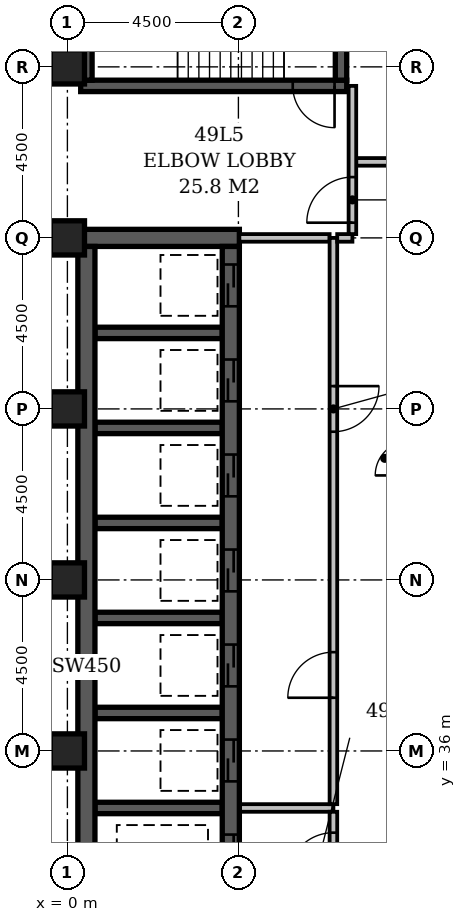
"""IFC4 building model, lengths in metres.
Left out: names, types, materials, properties, quantities, classifications, styles, units other than length and angle.
Written with IfcOpenShell. Run it as: python <this file> out.ifc"""

import sys

from ifc_helpers import new_model, si_unit, direction, frame, frame_2d, origin, origin_2d, place, context, subcontext, project, spatial, rectangle, extrude, element, fill, save


model = new_model("IFC4")
c1 = context("Model", 3, precision=1e-05, world=origin(), true_north=direction((0.0, 1.0)))
c2 = subcontext(c1, "Body", "Model", "MODEL_VIEW")
j1 = project(units=[si_unit("LENGTHUNIT", "METRE"), si_unit("PLANEANGLEUNIT", "RADIAN")], contexts=[c1])
p1 = place(None, origin())
s1 = spatial("IfcSite", under=j1, at=p1, CompositionType="ELEMENT")
p2 = place(p1, origin())
s2 = spatial("IfcBuilding", under=s1, at=p2, CompositionType="ELEMENT")
p3 = place(p2, frame((0.0, 0.0, 193.4)))
s3 = spatial("IfcBuildingStorey", under=s2, at=p3, CompositionType="ELEMENT", Elevation=193.4)
p4 = place(p3, frame((0.275, 49.5, -0.3), z_axis=(0.0, 0.0, 1.0), x_axis=(1.0, 0.0, 0.0)))
e1 = element("IfcWall", 1, at=p4, inside=s3, PredefinedType="SHEAR", context=c2, shape_type="SweptSolid", body=[
    extrude(rectangle(XDim=4.25, YDim=0.45, at=frame_2d((2.125, 0.0))), origin(), (0.0, 0.0, 1.0), 3.6),
])
p5 = place(p3, frame((0.35, 53.5, -0.3), z_axis=(0.0, 0.0, 1.0), x_axis=(1.0, 0.0, 0.0)))
e2 = element("IfcWall", 2, at=p5, inside=s3, PredefinedType="SHEAR", context=c2, shape_type="SweptSolid", body=[
    extrude(rectangle(XDim=7.0, YDim=0.3, at=frame_2d((3.5, 0.0))), origin(), (0.0, 0.0, 1.0), 3.6),
])
p6 = place(p5, frame((5.58, 0.0, 0.3)))
e3 = element("IfcOpeningElement", 3, at=p6, cuts=e2, PredefinedType="OPENING", context=c2, shape_type="SweptSolid", body=[
    extrude(rectangle(XDim=1.1, YDim=2.1, at=frame_2d((0.55, 1.05))), frame((0.0, 0.162, 0.0), z_axis=(0.0, -1.0, 0.0), x_axis=(1.0, 0.0, 0.0)), (0.0, 0.0, 1.0), 0.324),
])
p7 = place(p3, frame((0.5, 27.15, -0.3), z_axis=(0.0, 0.0, 1.0), x_axis=(0.0, 1.0, 0.0)))
e4 = element("IfcWall", 4, at=p7, inside=s3, PredefinedType="SHEAR", context=c2, shape_type="SweptSolid", body=[
    extrude(rectangle(XDim=22.125, YDim=0.45, at=frame_2d((11.062, 0.0))), origin(), (0.0, 0.0, 1.0), 3.6),
])
p8 = place(p3, frame((0.5, 53.65, -0.3), z_axis=(0.0, 0.0, 1.0), x_axis=(0.0, 1.0, 0.0)))
e5 = element("IfcWall", 5, at=p8, inside=s3, PredefinedType="SHEAR", context=c2, shape_type="SweptSolid", body=[
    extrude(rectangle(XDim=4.2, YDim=0.3, at=frame_2d((2.1, 0.0))), origin(), (0.0, 0.0, 1.0), 3.6),
])
for number, where, z_axis, x_axis in (
    (6, (0.725, 34.5, -0.3), (0.0, 0.0, 1.0), (1.0, 0.0, 0.0)),
    (7, (0.725, 37.0, -0.3), (0.0, 0.0, 1.0), (1.0, 0.0, 0.0)),
    (8, (0.725, 39.5, -0.3), (0.0, 0.0, 1.0), (1.0, 0.0, 0.0)),
    (9, (0.725, 42.0, -0.3), (0.0, 0.0, 1.0), (1.0, 0.0, 0.0)),
    (10, (0.725, 44.5, -0.3), (0.0, 0.0, 1.0), (1.0, 0.0, 0.0)),
    (11, (0.725, 47.0, -0.3), (0.0, 0.0, 1.0), (1.0, 0.0, 0.0)),
):
    element("IfcWall", number, at=place(p3, frame(where, z_axis=z_axis, x_axis=x_axis)), inside=s3, PredefinedType="SHEAR", context=c2, shape_type="SweptSolid", body=[
        extrude(rectangle(XDim=3.35, YDim=0.3, at=frame_2d((1.675, 0.0))), origin(), (0.0, 0.0, 1.0), 3.6),
    ])
p9 = place(p3, frame((4.3, 27.15, -0.3), z_axis=(0.0, 0.0, 1.0), x_axis=(0.0, 1.0, 0.0)))
e12 = element("IfcWall", 12, at=p9, inside=s3, PredefinedType="SHEAR", context=c2, shape_type="SweptSolid", body=[
    extrude(rectangle(XDim=22.125, YDim=0.45, at=frame_2d((11.062, 0.0))), origin(), (0.0, 0.0, 1.0), 3.6),
])
p10 = place(p9, frame((3.05, 0.0, 0.3)))
e13 = element("IfcOpeningElement", 13, at=p10, cuts=e12, PredefinedType="OPENING", context=c2, shape_type="SweptSolid", body=[
    extrude(rectangle(XDim=1.1, YDim=2.1, at=frame_2d((0.55, 1.05))), frame((0.0, 0.237, 0.0), z_axis=(0.0, -1.0, 0.0), x_axis=(1.0, 0.0, 0.0)), (0.0, 0.0, 1.0), 0.474),
])
p11 = place(p9, frame((0.55, 0.0, 0.3)))
e14 = element("IfcOpeningElement", 14, at=p11, cuts=e12, PredefinedType="OPENING", context=c2, shape_type="SweptSolid", body=[
    extrude(rectangle(XDim=1.1, YDim=2.1, at=frame_2d((0.55, 1.05))), frame((0.0, 0.237, 0.0), z_axis=(0.0, -1.0, 0.0), x_axis=(1.0, 0.0, 0.0)), (0.0, 0.0, 1.0), 0.474),
])
p12 = place(p9, frame((20.55, 0.0, 0.3)))
e15 = element("IfcOpeningElement", 15, at=p12, cuts=e12, PredefinedType="OPENING", context=c2, shape_type="SweptSolid", body=[
    extrude(rectangle(XDim=1.1, YDim=2.1, at=frame_2d((0.55, 1.05))), frame((0.0, 0.237, 0.0), z_axis=(0.0, -1.0, 0.0), x_axis=(1.0, 0.0, 0.0)), (0.0, 0.0, 1.0), 0.474),
])
p13 = place(p9, frame((18.05, 0.0, 0.3)))
e16 = element("IfcOpeningElement", 16, at=p13, cuts=e12, PredefinedType="OPENING", context=c2, shape_type="SweptSolid", body=[
    extrude(rectangle(XDim=1.1, YDim=2.1, at=frame_2d((0.55, 1.05))), frame((0.0, 0.237, 0.0), z_axis=(0.0, -1.0, 0.0), x_axis=(1.0, 0.0, 0.0)), (0.0, 0.0, 1.0), 0.474),
])
p14 = place(p9, frame((15.55, 0.0, 0.3)))
e17 = element("IfcOpeningElement", 17, at=p14, cuts=e12, PredefinedType="OPENING", context=c2, shape_type="SweptSolid", body=[
    extrude(rectangle(XDim=1.1, YDim=2.1, at=frame_2d((0.55, 1.05))), frame((0.0, 0.237, 0.0), z_axis=(0.0, -1.0, 0.0), x_axis=(1.0, 0.0, 0.0)), (0.0, 0.0, 1.0), 0.474),
])
p15 = place(p9, frame((13.05, 0.0, 0.3)))
e18 = element("IfcOpeningElement", 18, at=p15, cuts=e12, PredefinedType="OPENING", context=c2, shape_type="SweptSolid", body=[
    extrude(rectangle(XDim=1.1, YDim=2.1, at=frame_2d((0.55, 1.05))), frame((0.0, 0.237, 0.0), z_axis=(0.0, -1.0, 0.0), x_axis=(1.0, 0.0, 0.0)), (0.0, 0.0, 1.0), 0.474),
])
p16 = place(p9, frame((10.55, 0.0, 0.3)))
e19 = element("IfcOpeningElement", 19, at=p16, cuts=e12, PredefinedType="OPENING", context=c2, shape_type="SweptSolid", body=[
    extrude(rectangle(XDim=1.1, YDim=2.1, at=frame_2d((0.55, 1.05))), frame((0.0, 0.237, 0.0), z_axis=(0.0, -1.0, 0.0), x_axis=(1.0, 0.0, 0.0)), (0.0, 0.0, 1.0), 0.474),
])
p17 = place(p9, frame((8.05, 0.0, 0.3)))
e20 = element("IfcOpeningElement", 20, at=p17, cuts=e12, PredefinedType="OPENING", context=c2, shape_type="SweptSolid", body=[
    extrude(rectangle(XDim=1.1, YDim=2.1, at=frame_2d((0.55, 1.05))), frame((0.0, 0.237, 0.0), z_axis=(0.0, -1.0, 0.0), x_axis=(1.0, 0.0, 0.0)), (0.0, 0.0, 1.0), 0.474),
])
p18 = place(p9, frame((5.55, 0.0, 0.3)))
e21 = element("IfcOpeningElement", 21, at=p18, cuts=e12, PredefinedType="OPENING", context=c2, shape_type="SweptSolid", body=[
    extrude(rectangle(XDim=1.1, YDim=2.1, at=frame_2d((0.55, 1.05))), frame((0.0, 0.237, 0.0), z_axis=(0.0, -1.0, 0.0), x_axis=(1.0, 0.0, 0.0)), (0.0, 0.0, 1.0), 0.474),
])
p19 = place(p3, frame((7.2, 53.65, -0.3), z_axis=(0.0, 0.0, 1.0), x_axis=(0.0, 1.0, 0.0)))
e22 = element("IfcWall", 22, at=p19, inside=s3, PredefinedType="SHEAR", context=c2, shape_type="SweptSolid", body=[
    extrude(rectangle(XDim=4.2, YDim=0.3, at=frame_2d((2.1, 0.0))), origin(), (0.0, 0.0, 1.0), 3.6),
])
for number, where, z_axis, x_axis in (
    (23, (0.0, 36.0, -0.3), (0.0, 0.0, 1.0), (1.0, 0.0, 0.0)),
    (24, (0.0, 40.5, -0.3), (0.0, 0.0, 1.0), (1.0, 0.0, 0.0)),
    (25, (0.0, 45.0, -0.3), (0.0, 0.0, 1.0), (1.0, 0.0, 0.0)),
    (26, (0.0, 49.5, -0.3), (0.0, 0.0, 1.0), (1.0, 0.0, 0.0)),
    (27, (0.0, 54.0, -0.3), (0.0, 0.0, 1.0), (1.0, 0.0, 0.0)),
):
    element("IfcColumn", number, at=place(p3, frame(where, z_axis=z_axis, x_axis=x_axis)), inside=s3, PredefinedType="COLUMN", context=c2, shape_type="SweptSolid", body=[
        extrude(rectangle(XDim=0.9, YDim=0.9, at=origin_2d()), origin(), (0.0, 0.0, 1.0), 3.6),
    ])
p20 = place(p3, frame((4.545, 34.5, 0.0), z_axis=(0.0, 0.0, 1.0), x_axis=(1.0, 0.0, 0.0)))
e28 = element("IfcWall", 28, at=p20, inside=s3, PredefinedType="PARTITIONING", context=c2, shape_type="SweptSolid", body=[
    extrude(rectangle(XDim=2.455, YDim=0.2, at=frame_2d((1.228, 0.0))), origin(), (0.0, 0.0, 1.0), 3.3),
])
p21 = place(p3, frame((7.0, 34.6, 0.0), z_axis=(0.0, 0.0, 1.0), x_axis=(0.0, 1.0, 0.0)))
e29 = element("IfcWall", 29, at=p21, inside=s3, PredefinedType="PARTITIONING", context=c2, shape_type="SweptSolid", body=[
    extrude(rectangle(XDim=14.9, YDim=0.2, at=frame_2d((7.45, 0.0))), origin(), (0.0, 0.0, 1.0), 3.3),
])
p22 = place(p21, frame((2.8, 0.0, 0.0)))
e30 = element("IfcOpeningElement", 30, at=p22, cuts=e29, PredefinedType="OPENING", context=c2, shape_type="SweptSolid", body=[
    extrude(rectangle(XDim=1.2, YDim=2.1, at=frame_2d((0.6, 1.05))), frame((0.0, 0.112, 0.0), z_axis=(0.0, -1.0, 0.0), x_axis=(1.0, 0.0, 0.0)), (0.0, 0.0, 1.0), 0.224),
])
p23 = place(p21, frame((9.8, 0.0, 0.0)))
e31 = element("IfcOpeningElement", 31, at=p23, cuts=e29, PredefinedType="OPENING", context=c2, shape_type="SweptSolid", body=[
    extrude(rectangle(XDim=1.2, YDim=2.1, at=frame_2d((0.6, 1.05))), frame((0.0, 0.112, 0.0), z_axis=(0.0, -1.0, 0.0), x_axis=(1.0, 0.0, 0.0)), (0.0, 0.0, 1.0), 0.224),
])
p24 = place(p3, frame((4.525, 49.5, 0.0), z_axis=(0.0, 0.0, 1.0), x_axis=(1.0, 0.0, 0.0)))
e32 = element("IfcWall", 32, at=p24, inside=s3, PredefinedType="PARTITIONING", context=c2, shape_type="SweptSolid", body=[
    extrude(rectangle(XDim=2.375, YDim=0.2, at=frame_2d((1.188, 0.0))), origin(), (0.0, 0.0, 1.0), 3.3),
])
p25 = place(p3, frame((7.0, 32.1, 0.0), z_axis=(0.0, 0.0, 1.0), x_axis=(0.0, 1.0, 0.0)))
e33 = element("IfcWall", 33, at=p25, inside=s3, PredefinedType="PARTITIONING", context=c2, shape_type="SweptSolid", body=[
    extrude(rectangle(XDim=2.3, YDim=0.2, at=frame_2d((1.15, 0.0))), origin(), (0.0, 0.0, 1.0), 3.3),
])
p26 = place(p25, frame((0.55, 0.0, 0.0)))
e34 = element("IfcOpeningElement", 34, at=p26, cuts=e33, PredefinedType="OPENING", context=c2, shape_type="SweptSolid", body=[
    extrude(rectangle(XDim=1.2, YDim=2.1, at=frame_2d((0.6, 1.05))), frame((0.0, 0.112, 0.0), z_axis=(0.0, -1.0, 0.0), x_axis=(1.0, 0.0, 0.0)), (0.0, 0.0, 1.0), 0.224),
])
p27 = place(p3, frame((7.1, 49.5, 0.0), z_axis=(0.0, 0.0, 1.0), x_axis=(1.0, 0.0, 0.0)))
e35 = element("IfcWall", 35, at=p27, inside=s3, PredefinedType="PARTITIONING", context=c2, shape_type="SweptSolid", body=[
    extrude(rectangle(XDim=0.4, YDim=0.2, at=frame_2d((0.2, 0.0))), origin(), (0.0, 0.0, 1.0), 3.3),
])
p28 = place(p3, frame((7.5, 49.6, 0.0), z_axis=(0.0, 0.0, 1.0), x_axis=(0.0, 1.0, 0.0)))
e36 = element("IfcWall", 36, at=p28, inside=s3, PredefinedType="PARTITIONING", context=c2, shape_type="SweptSolid", body=[
    extrude(rectangle(XDim=3.9, YDim=0.2, at=frame_2d((1.95, 0.0))), origin(), (0.0, 0.0, 1.0), 3.3),
])
p29 = place(p28, frame((0.3, 0.0, 0.0)))
e37 = element("IfcOpeningElement", 37, at=p29, cuts=e36, PredefinedType="OPENING", context=c2, shape_type="SweptSolid", body=[
    extrude(rectangle(XDim=1.2, YDim=2.1, at=frame_2d((0.6, 1.05))), frame((0.0, 0.112, 0.0), z_axis=(0.0, -1.0, 0.0), x_axis=(1.0, 0.0, 0.0)), (0.0, 0.0, 1.0), 0.224),
])
p30 = place(p3, frame((7.6, 51.5, 0.0), z_axis=(0.0, 0.0, 1.0), x_axis=(1.0, 0.0, 0.0)))
e38 = element("IfcWall", 38, at=p30, inside=s3, PredefinedType="PARTITIONING", context=c2, shape_type="SweptSolid", body=[
    extrude(rectangle(XDim=15.3, YDim=0.2, at=frame_2d((7.65, 0.0))), origin(), (0.0, 0.0, 1.0), 3.3),
])
p31 = place(p30, frame((7.2, 0.0, 0.0)))
e39 = element("IfcOpeningElement", 39, at=p31, cuts=e38, PredefinedType="OPENING", context=c2, shape_type="SweptSolid", body=[
    extrude(rectangle(XDim=0.9, YDim=2.1, at=frame_2d((0.45, 1.05))), frame((0.0, 0.112, 0.0), z_axis=(0.0, -1.0, 0.0), x_axis=(1.0, 0.0, 0.0)), (0.0, 0.0, 1.0), 0.224),
])
p32 = place(p29, origin())
e40 = element("IfcDoor", 40, at=p32, inside=s3, OperationType="SINGLE_SWING_LEFT", PredefinedType="DOOR", context=c2, shape_type="SweptSolid", body=[
    extrude(rectangle(XDim=1.2, YDim=2.1, at=frame_2d((0.6, 1.05))), frame((0.0, 0.025, 0.0), z_axis=(0.0, -1.0, 0.0), x_axis=(1.0, 0.0, 0.0)), (0.0, 0.0, 1.0), 0.05),
])
fill(e37, e40)
p33 = place(p12, origin())
e41 = element("IfcDoor", 41, at=p33, inside=s3, OperationType="SLIDING_TO_LEFT", PredefinedType="DOOR", context=c2, shape_type="SweptSolid", body=[
    extrude(rectangle(XDim=1.1, YDim=2.1, at=frame_2d((0.55, 1.05))), frame((0.0, 0.025, 0.0), z_axis=(0.0, -1.0, 0.0), x_axis=(1.0, 0.0, 0.0)), (0.0, 0.0, 1.0), 0.05),
])
fill(e15, e41)
p34 = place(p13, origin())
e42 = element("IfcDoor", 42, at=p34, inside=s3, OperationType="SLIDING_TO_LEFT", PredefinedType="DOOR", context=c2, shape_type="SweptSolid", body=[
    extrude(rectangle(XDim=1.1, YDim=2.1, at=frame_2d((0.55, 1.05))), frame((0.0, 0.025, 0.0), z_axis=(0.0, -1.0, 0.0), x_axis=(1.0, 0.0, 0.0)), (0.0, 0.0, 1.0), 0.05),
])
fill(e16, e42)
p35 = place(p14, origin())
e43 = element("IfcDoor", 43, at=p35, inside=s3, OperationType="SLIDING_TO_LEFT", PredefinedType="DOOR", context=c2, shape_type="SweptSolid", body=[
    extrude(rectangle(XDim=1.1, YDim=2.1, at=frame_2d((0.55, 1.05))), frame((0.0, 0.025, 0.0), z_axis=(0.0, -1.0, 0.0), x_axis=(1.0, 0.0, 0.0)), (0.0, 0.0, 1.0), 0.05),
])
fill(e17, e43)
p36 = place(p15, origin())
e44 = element("IfcDoor", 44, at=p36, inside=s3, OperationType="SLIDING_TO_LEFT", PredefinedType="DOOR", context=c2, shape_type="SweptSolid", body=[
    extrude(rectangle(XDim=1.1, YDim=2.1, at=frame_2d((0.55, 1.05))), frame((0.0, 0.025, 0.0), z_axis=(0.0, -1.0, 0.0), x_axis=(1.0, 0.0, 0.0)), (0.0, 0.0, 1.0), 0.05),
])
fill(e18, e44)
p37 = place(p16, origin())
e45 = element("IfcDoor", 45, at=p37, inside=s3, OperationType="SLIDING_TO_LEFT", PredefinedType="DOOR", context=c2, shape_type="SweptSolid", body=[
    extrude(rectangle(XDim=1.1, YDim=2.1, at=frame_2d((0.55, 1.05))), frame((0.0, 0.025, 0.0), z_axis=(0.0, -1.0, 0.0), x_axis=(1.0, 0.0, 0.0)), (0.0, 0.0, 1.0), 0.05),
])
fill(e19, e45)
p38 = place(p17, origin())
e46 = element("IfcDoor", 46, at=p38, inside=s3, OperationType="SLIDING_TO_LEFT", PredefinedType="DOOR", context=c2, shape_type="SweptSolid", body=[
    extrude(rectangle(XDim=1.1, YDim=2.1, at=frame_2d((0.55, 1.05))), frame((0.0, 0.025, 0.0), z_axis=(0.0, -1.0, 0.0), x_axis=(1.0, 0.0, 0.0)), (0.0, 0.0, 1.0), 0.05),
])
fill(e20, e46)
p39 = place(p22, origin())
e47 = element("IfcDoor", 47, at=p39, inside=s3, OperationType="SINGLE_SWING_LEFT", PredefinedType="DOOR", context=c2, shape_type="SweptSolid", body=[
    extrude(rectangle(XDim=1.2, YDim=2.1, at=frame_2d((0.6, 1.05))), frame((0.0, 0.025, 0.0), z_axis=(0.0, -1.0, 0.0), x_axis=(1.0, 0.0, 0.0)), (0.0, 0.0, 1.0), 0.05),
])
fill(e30, e47)
p40 = place(p23, origin())
e48 = element("IfcDoor", 48, at=p40, inside=s3, OperationType="SINGLE_SWING_RIGHT", PredefinedType="DOOR", context=c2, shape_type="SweptSolid", body=[
    extrude(rectangle(XDim=1.2, YDim=2.1, at=frame_2d((0.6, 1.05))), frame((0.0, 0.025, 0.0), z_axis=(0.0, -1.0, 0.0), x_axis=(1.0, 0.0, 0.0)), (0.0, 0.0, 1.0), 0.05),
])
fill(e31, e48)
p41 = place(p26, origin())
e49 = element("IfcDoor", 49, at=p41, inside=s3, OperationType="SINGLE_SWING_LEFT", PredefinedType="DOOR", context=c2, shape_type="SweptSolid", body=[
    extrude(rectangle(XDim=1.2, YDim=2.1, at=frame_2d((0.6, 1.05))), frame((0.0, 0.025, 0.0), z_axis=(0.0, -1.0, 0.0), x_axis=(1.0, 0.0, 0.0)), (0.0, 0.0, 1.0), 0.05),
])
fill(e34, e49)
p42 = place(p18, origin())
e50 = element("IfcDoor", 50, at=p42, inside=s3, OperationType="SLIDING_TO_LEFT", PredefinedType="DOOR", context=c2, shape_type="SweptSolid", body=[
    extrude(rectangle(XDim=1.1, YDim=2.1, at=frame_2d((0.55, 1.05))), frame((0.0, 0.025, 0.0), z_axis=(0.0, -1.0, 0.0), x_axis=(1.0, 0.0, 0.0)), (0.0, 0.0, 1.0), 0.05),
])
fill(e21, e50)
p43 = place(p6, origin())
e51 = element("IfcDoor", 51, at=p43, inside=s3, OperationType="SINGLE_SWING_RIGHT", PredefinedType="DOOR", context=c2, shape_type="SweptSolid", body=[
    extrude(rectangle(XDim=1.1, YDim=2.1, at=frame_2d((0.55, 1.05))), frame((0.0, 0.025, 0.0), z_axis=(0.0, -1.0, 0.0), x_axis=(1.0, 0.0, 0.0)), (0.0, 0.0, 1.0), 0.05),
])
fill(e3, e51)
save(model, sys.argv[1])
